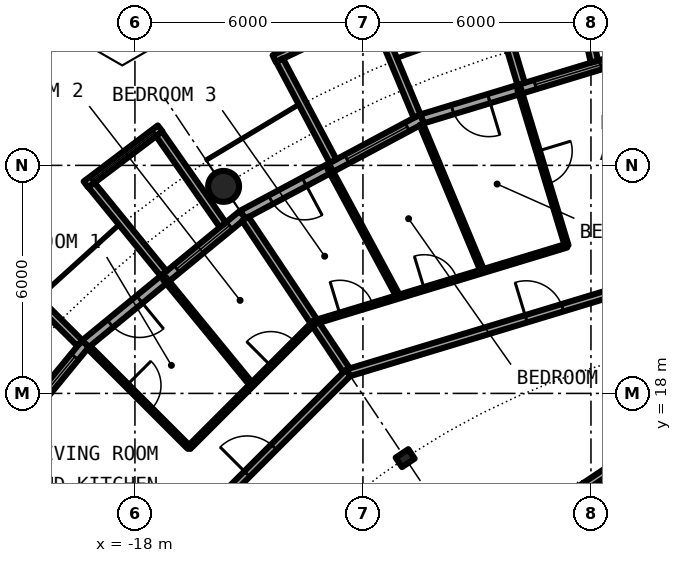
"""IFC4 building model, lengths in metres.
Left out: names, types, materials, properties, quantities, classifications, styles, units other than length and angle.
Written with IfcOpenShell. Run it as: python <this file> out.ifc"""

import sys

from ifc_helpers import new_model, si_unit, direction, frame, frame_2d, origin, origin_2d, place, context, subcontext, project, spatial, rectangle, circle, hollow_circle, i_section, extrude, element, fill, save


model = new_model("IFC4")
c1 = context("Model", 3, precision=1e-05, world=origin(), true_north=direction((0.0, 1.0)))
c2 = subcontext(c1, "Body", "Model", "MODEL_VIEW")
j1 = project(units=[si_unit("LENGTHUNIT", "METRE"), si_unit("PLANEANGLEUNIT", "RADIAN")], contexts=[c1])
p1 = place(None, origin())
s1 = spatial("IfcSite", under=j1, at=p1, CompositionType="ELEMENT")
p2 = place(p1, origin())
s2 = spatial("IfcBuilding", under=s1, at=p2, CompositionType="ELEMENT")
p3 = place(p2, frame((0.0, 0.0, 199.35)))
s3 = spatial("IfcBuildingStorey", under=s2, at=p3, CompositionType="ELEMENT", Elevation=199.35)
p4 = place(p3, frame((-15.667, 23.448, 0.0), z_axis=(0.0, 0.0, 1.0), x_axis=(1.0, 0.0, 0.0)))
e1 = element("IfcColumn", 1, at=p4, inside=s3, PredefinedType="COLUMN", context=c2, shape_type="SweptSolid", body=[
    extrude(hollow_circle(Radius=0.406, WallThickness=0.03, at=origin_2d()), origin(), (0.0, 0.0, 1.0), 3.05),
])
p5 = place(p3, frame((-10.889, 16.297, 0.0), z_axis=(0.0, 0.0, 1.0), x_axis=(-0.55557023302, 0.831469612303, 0.0)))
e2 = element("IfcColumn", 2, at=p5, inside=s3, PredefinedType="COLUMN", context=c2, shape_type="SweptSolid", body=[
    extrude(i_section(OverallWidth=0.3, OverallDepth=0.4, WebThickness=0.013, FlangeThickness=0.024, FilletRadius=0.027, at=origin_2d()), origin(), (0.0, 0.0, 1.0), 3.05),
])
p6 = place(p3, frame((-5.326, 26.775, 0.0), z_axis=(0.0, 0.0, 1.0), x_axis=(-0.956965678721, -0.290201119486, 0.0)))
e3 = element("IfcWall", 3, at=p6, inside=s3, PredefinedType="SOLIDWALL", context=c2, shape_type="SweptSolid", body=[
    extrude(rectangle(XDim=5.351, YDim=0.25, at=frame_2d((2.676, 0.0))), origin(), (0.0, 0.0, 1.0), 2.7),
])
p7 = place(p6, frame((0.441, 0.0, 0.3)))
e4 = element("IfcOpeningElement", 4, at=p7, cuts=e3, PredefinedType="OPENING", context=c2, shape_type="SweptSolid", body=[
    extrude(rectangle(XDim=1.8, YDim=2.1, at=frame_2d((0.9, 1.05))), frame((0.0, 0.135, 0.0), z_axis=(0.0, -1.0, 0.0), x_axis=(1.0, 0.0, 0.0)), (0.0, 0.0, 1.0), 0.27),
])
p8 = place(p6, frame((3.51, 0.0, 0.0)))
e5 = element("IfcOpeningElement", 5, at=p8, cuts=e3, PredefinedType="OPENING", context=c2, shape_type="SweptSolid", body=[
    extrude(rectangle(XDim=1.0, YDim=2.2, at=frame_2d((0.5, 1.1))), frame((0.0, 0.135, 0.0), z_axis=(0.0, -1.0, 0.0), x_axis=(1.0, 0.0, 0.0)), (0.0, 0.0, 1.0), 0.27),
])
p9 = place(p3, frame((-5.909, 26.729, -0.03), z_axis=(0.0, 0.0, 1.0), x_axis=(-0.216409053917, 0.976302781612, 0.0)))
e6 = element("IfcWall", 6, at=p9, inside=s3, PredefinedType="SOLIDWALL", context=c2, shape_type="SweptSolid", body=[
    extrude(rectangle(XDim=2.925, YDim=0.2, at=frame_2d((1.463, 0.0))), origin(), (0.0, 0.0, 1.0), 2.73),
])
p10 = place(p3, frame((-7.837, 26.144, -0.03), z_axis=(0.0, 0.0, 1.0), x_axis=(-0.287064767992, 0.957911174889, 0.0)))
e7 = element("IfcWall", 7, at=p10, inside=s3, PredefinedType="SOLIDWALL", context=c2, shape_type="SweptSolid", body=[
    extrude(rectangle(XDim=3.006, YDim=0.2, at=frame_2d((1.503, 0.0))), origin(), (0.0, 0.0, 1.0), 2.73),
])
p11 = place(p3, frame((-10.447, 25.222, 0.0), z_axis=(0.0, 0.0, 1.0), x_axis=(-0.881915646801, -0.471407246368, 0.0)))
e8 = element("IfcWall", 8, at=p11, inside=s3, PredefinedType="SOLIDWALL", context=c2, shape_type="SweptSolid", body=[
    extrude(rectangle(XDim=5.352, YDim=0.25, at=frame_2d((2.676, 0.0))), origin(), (0.0, 0.0, 1.0), 2.7),
])
p12 = place(p11, frame((0.441, 0.0, 0.3)))
e9 = element("IfcOpeningElement", 9, at=p12, cuts=e8, PredefinedType="OPENING", context=c2, shape_type="SweptSolid", body=[
    extrude(rectangle(XDim=1.8, YDim=2.1, at=frame_2d((0.9, 1.05))), frame((0.0, 0.135, 0.0), z_axis=(0.0, -1.0, 0.0), x_axis=(1.0, 0.0, 0.0)), (0.0, 0.0, 1.0), 0.27),
])
p13 = place(p11, frame((3.51, 0.0, 0.0)))
e10 = element("IfcOpeningElement", 10, at=p13, cuts=e8, PredefinedType="OPENING", context=c2, shape_type="SweptSolid", body=[
    extrude(rectangle(XDim=1.0, YDim=2.2, at=frame_2d((0.5, 1.1))), frame((0.0, 0.135, 0.0), z_axis=(0.0, -1.0, 0.0), x_axis=(1.0, 0.0, 0.0)), (0.0, 0.0, 1.0), 0.27),
])
p14 = place(p3, frame((-11.629, 28.088, -0.03), z_axis=(0.0, 0.0, 1.0), x_axis=(-0.904000060331, -0.427532327342, 0.0)))
e11 = element("IfcWall", 11, at=p14, inside=s3, PredefinedType="SOLIDWALL", context=c2, shape_type="SweptSolid", body=[
    extrude(rectangle(XDim=2.993, YDim=0.2, at=frame_2d((1.497, 0.0))), origin(), (0.0, 0.0, 1.0), 2.73),
])
p15 = place(p14, frame((0.457, 0.0, 0.33)))
e12 = element("IfcOpeningElement", 12, at=p15, cuts=e11, PredefinedType="OPENING", context=c2, shape_type="SweptSolid", body=[
    extrude(circle(Radius=1.04, at=frame_2d((1.04, 1.04))), frame((0.0, 0.11, 0.0), z_axis=(0.0, -1.0, 0.0), x_axis=(1.0, 0.0, 0.0)), (0.0, 0.0, 1.0), 0.22),
])
p16 = place(p3, frame((-10.575, 25.295, -0.03), z_axis=(0.0, 0.0, 1.0), x_axis=(-0.385697364644, 0.922625353492, 0.0)))
e13 = element("IfcWall", 13, at=p16, inside=s3, PredefinedType="SOLIDWALL", context=c2, shape_type="SweptSolid", body=[
    extrude(rectangle(XDim=2.883, YDim=0.2, at=frame_2d((1.442, 0.0))), origin(), (0.0, 0.0, 1.0), 2.73),
])
p17 = place(p3, frame((-12.787, 24.113, -0.03), z_axis=(0.0, 0.0, 1.0), x_axis=(-0.468365282436, 0.883534924159, 0.0)))
e14 = element("IfcWall", 14, at=p17, inside=s3, PredefinedType="SOLIDWALL", context=c2, shape_type="SweptSolid", body=[
    extrude(rectangle(XDim=3.006, YDim=0.2, at=frame_2d((1.503, 0.0))), origin(), (0.0, 0.0, 1.0), 2.73),
])
p18 = place(p3, frame((-15.167, 22.699, 0.0), z_axis=(0.0, 0.0, 1.0), x_axis=(-0.773019449054, -0.634382322723, 0.0)))
e15 = element("IfcWall", 15, at=p18, inside=s3, PredefinedType="SOLIDWALL", context=c2, shape_type="SweptSolid", body=[
    extrude(rectangle(XDim=5.352, YDim=0.25, at=frame_2d((2.676, 0.0))), origin(), (0.0, 0.0, 1.0), 2.7),
])
p19 = place(p18, frame((0.441, 0.0, 0.3)))
e16 = element("IfcOpeningElement", 16, at=p19, cuts=e15, PredefinedType="OPENING", context=c2, shape_type="SweptSolid", body=[
    extrude(rectangle(XDim=1.8, YDim=2.1, at=frame_2d((0.9, 1.05))), frame((0.0, 0.135, 0.0), z_axis=(0.0, -1.0, 0.0), x_axis=(1.0, 0.0, 0.0)), (0.0, 0.0, 1.0), 0.27),
])
p20 = place(p18, frame((3.51, 0.0, 0.0)))
e17 = element("IfcOpeningElement", 17, at=p20, cuts=e15, PredefinedType="OPENING", context=c2, shape_type="SweptSolid", body=[
    extrude(rectangle(XDim=1.0, YDim=2.2, at=frame_2d((0.5, 1.1))), frame((0.0, 0.135, 0.0), z_axis=(0.0, -1.0, 0.0), x_axis=(1.0, 0.0, 0.0)), (0.0, 0.0, 1.0), 0.27),
])
p21 = place(p3, frame((-17.337, 24.972, -0.03), z_axis=(0.0, 0.0, 1.0), x_axis=(-0.797887588059, -0.602806268067, 0.0)))
e18 = element("IfcWall", 18, at=p21, inside=s3, PredefinedType="SOLIDWALL", context=c2, shape_type="SweptSolid", body=[
    extrude(rectangle(XDim=2.447, YDim=0.2, at=frame_2d((1.223, 0.0))), origin(), (0.0, 0.0, 1.0), 2.73),
])
p22 = place(p21, frame((0.183, 0.0, 0.33)))
e19 = element("IfcOpeningElement", 19, at=p22, cuts=e18, PredefinedType="OPENING", context=c2, shape_type="SweptSolid", body=[
    extrude(circle(Radius=1.04, at=frame_2d((1.04, 1.04))), frame((0.0, 0.11, 0.0), z_axis=(0.0, -1.0, 0.0), x_axis=(1.0, 0.0, 0.0)), (0.0, 0.0, 1.0), 0.22),
])
p23 = place(p3, frame((-15.688, 22.433, -0.03), z_axis=(0.0, 0.0, 1.0), x_axis=(-0.573260687834, 0.819373043115, 0.0)))
e20 = element("IfcWall", 20, at=p23, inside=s3, PredefinedType="SOLIDWALL", context=c2, shape_type="SweptSolid", body=[
    extrude(rectangle(XDim=2.925, YDim=0.2, at=frame_2d((1.463, 0.0))), origin(), (0.0, 0.0, 1.0), 2.73),
])
p24 = place(p3, frame((-17.246, 21.155, -0.03), z_axis=(0.0, 0.0, 1.0), x_axis=(-0.631741648902, 0.775179004516, 0.0)))
e21 = element("IfcWall", 21, at=p24, inside=s3, PredefinedType="SOLIDWALL", context=c2, shape_type="SweptSolid", body=[
    extrude(rectangle(XDim=3.006, YDim=0.2, at=frame_2d((1.503, 0.0))), origin(), (0.0, 0.0, 1.0), 2.73),
])
p25 = place(p3, frame((-19.304, 19.304, 0.0), z_axis=(0.0, 0.0, 1.0), x_axis=(-0.634382322723, -0.773019449054, 0.0)))
e22 = element("IfcWall", 22, at=p25, inside=s3, PredefinedType="SOLIDWALL", context=c2, shape_type="SweptSolid", body=[
    extrude(rectangle(XDim=5.352, YDim=0.25, at=frame_2d((2.676, 0.0))), origin(), (0.0, 0.0, 1.0), 2.7),
])
p26 = place(p25, frame((0.441, 0.0, 0.3)))
e23 = element("IfcOpeningElement", 23, at=p26, cuts=e22, PredefinedType="OPENING", context=c2, shape_type="SweptSolid", body=[
    extrude(rectangle(XDim=1.8, YDim=2.1, at=frame_2d((0.9, 1.05))), frame((0.0, 0.135, 0.0), z_axis=(0.0, -1.0, 0.0), x_axis=(1.0, 0.0, 0.0)), (0.0, 0.0, 1.0), 0.27),
])
p27 = place(p25, frame((3.51, 0.0, 0.0)))
e24 = element("IfcOpeningElement", 24, at=p27, cuts=e22, PredefinedType="OPENING", context=c2, shape_type="SweptSolid", body=[
    extrude(rectangle(XDim=1.0, YDim=2.2, at=frame_2d((0.5, 1.1))), frame((0.0, 0.135, 0.0), z_axis=(0.0, -1.0, 0.0), x_axis=(1.0, 0.0, 0.0)), (0.0, 0.0, 1.0), 0.27),
])
p28 = place(p3, frame((-19.45, 19.323, -0.03), z_axis=(0.0, 0.0, 1.0), x_axis=(-0.709727076896, 0.704476739375, 0.0)))
e25 = element("IfcWall", 25, at=p28, inside=s3, PredefinedType="SOLIDWALL", context=c2, shape_type="SweptSolid", body=[
    extrude(rectangle(XDim=2.883, YDim=0.2, at=frame_2d((1.441, 0.0))), origin(), (0.0, 0.0, 1.0), 2.73),
])
p29 = place(p3, frame((-19.216, 19.216, 0.0), z_axis=(0.0, 0.0, 1.0), x_axis=(0.707106781187, -0.707106781187, 0.0)))
e26 = element("IfcWall", 26, at=p29, inside=s3, PredefinedType="PARTITIONING", context=c2, shape_type="SweptSolid", body=[
    extrude(rectangle(XDim=3.735, YDim=0.1, at=frame_2d((1.868, 0.0))), origin(), (0.0, 0.0, 1.0), 2.7),
])
p30 = place(p29, frame((1.417, 0.0, 0.0)))
e27 = element("IfcOpeningElement", 27, at=p30, cuts=e26, PredefinedType="OPENING", context=c2, shape_type="SweptSolid", body=[
    extrude(rectangle(XDim=0.9, YDim=2.3, at=frame_2d((0.45, 1.15))), frame((0.0, 0.06, 0.0), z_axis=(0.0, -1.0, 0.0), x_axis=(1.0, 0.0, 0.0)), (0.0, 0.0, 1.0), 0.12),
])
p31 = place(p3, frame((-17.22, 21.023, 0.0), z_axis=(0.0, 0.0, 1.0), x_axis=(0.633737383709, -0.773548271597, 0.0)))
e28 = element("IfcWall", 28, at=p31, inside=s3, PredefinedType="PARTITIONING", context=c2, shape_type="SweptSolid", body=[
    extrude(rectangle(XDim=3.618, YDim=0.1, at=frame_2d((1.809, 0.0))), origin(), (0.0, 0.0, 1.0), 2.7),
])
p32 = place(p3, frame((-15.097, 22.596, 0.0), z_axis=(0.0, 0.0, 1.0), x_axis=(0.555462686211, -0.831541462723, 0.0)))
e29 = element("IfcWall", 29, at=p32, inside=s3, PredefinedType="PARTITIONING", context=c2, shape_type="SweptSolid", body=[
    extrude(rectangle(XDim=4.875, YDim=0.2, at=frame_2d((2.438, 0.0))), origin(), (0.0, 0.0, 1.0), 2.7),
])
p33 = place(p3, frame((-12.887, 23.925, 0.0), z_axis=(0.0, 0.0, 1.0), x_axis=(0.474281720599, -0.88037313084, 0.0)))
e30 = element("IfcWall", 30, at=p33, inside=s3, PredefinedType="PARTITIONING", context=c2, shape_type="SweptSolid", body=[
    extrude(rectangle(XDim=3.842, YDim=0.1, at=frame_2d((1.921, 0.0))), origin(), (0.0, 0.0, 1.0), 2.7),
])
p34 = place(p3, frame((-10.465, 25.079, 0.0), z_axis=(0.0, 0.0, 1.0), x_axis=(0.385232176411, -0.922819684585, 0.0)))
e31 = element("IfcWall", 31, at=p34, inside=s3, PredefinedType="PARTITIONING", context=c2, shape_type="SweptSolid", body=[
    extrude(rectangle(XDim=4.187, YDim=0.1, at=frame_2d((2.094, 0.0))), origin(), (0.0, 0.0, 1.0), 2.7),
])
p35 = place(p3, frame((-7.888, 26.005, 0.0), z_axis=(0.0, 0.0, 1.0), x_axis=(0.290193157742, -0.956968093094, 0.0)))
e32 = element("IfcWall", 32, at=p35, inside=s3, PredefinedType="PARTITIONING", context=c2, shape_type="SweptSolid", body=[
    extrude(rectangle(XDim=4.304, YDim=0.1, at=frame_2d((2.152, 0.0))), origin(), (0.0, 0.0, 1.0), 2.7),
])
p36 = place(p35, frame((1.702, 0.0, 0.0)))
e33 = element("IfcOpeningElement", 33, at=p36, cuts=e32, PredefinedType="OPENING", context=c2, shape_type="SweptSolid", body=[
    extrude(rectangle(XDim=0.9, YDim=2.3, at=frame_2d((0.45, 1.15))), frame((0.0, 0.06, 0.0), z_axis=(0.0, -1.0, 0.0), x_axis=(1.0, 0.0, 0.0)), (0.0, 0.0, 1.0), 0.12),
])
p37 = place(p3, frame((-14.718, 9.832, 0.0), z_axis=(0.0, 0.0, 1.0), x_axis=(0.831437137577, 0.555618831806, 0.0)))
e34 = element("IfcWall", 34, at=p37, inside=s3, PredefinedType="PARTITIONING", context=c2, shape_type="SweptSolid", body=[
    extrude(rectangle(XDim=13.549, YDim=0.2, at=frame_2d((6.774, 0.0))), origin(), (0.0, 0.0, 1.0), 2.7),
])
p38 = place(p37, frame((7.968, 0.0, 0.0)))
e35 = element("IfcOpeningElement", 35, at=p38, cuts=e34, PredefinedType="OPENING", context=c2, shape_type="SweptSolid", body=[
    extrude(rectangle(XDim=1.0, YDim=2.3, at=frame_2d((0.5, 1.15))), frame((0.0, 0.11, 0.0), z_axis=(0.0, -1.0, 0.0), x_axis=(1.0, 0.0, 0.0)), (0.0, 0.0, 1.0), 0.22),
])
p39 = place(p3, frame((-12.389, 18.542, 0.0), z_axis=(0.0, 0.0, 1.0), x_axis=(0.956942051091, 0.290279022415, 0.0)))
e36 = element("IfcWall", 36, at=p39, inside=s3, PredefinedType="PARTITIONING", context=c2, shape_type="SweptSolid", body=[
    extrude(rectangle(XDim=12.946, YDim=0.2, at=frame_2d((6.473, 0.0))), origin(), (0.0, 0.0, 1.0), 2.7),
])
p40 = place(p39, frame((4.895, 0.0, 0.0)))
e37 = element("IfcOpeningElement", 37, at=p40, cuts=e36, PredefinedType="OPENING", context=c2, shape_type="SweptSolid", body=[
    extrude(rectangle(XDim=1.0, YDim=2.3, at=frame_2d((0.5, 1.15))), frame((0.0, 0.11, 0.0), z_axis=(0.0, -1.0, 0.0), x_axis=(1.0, 0.0, 0.0)), (0.0, 0.0, 1.0), 0.22),
])
p41 = place(p3, frame((-18.542, 12.389, 0.0), z_axis=(0.0, 0.0, 1.0), x_axis=(0.707106781187, 0.707106781187, 0.0)))
e38 = element("IfcWall", 38, at=p41, inside=s3, PredefinedType="PARTITIONING", context=c2, shape_type="SweptSolid", body=[
    extrude(rectangle(XDim=8.702, YDim=0.2, at=frame_2d((4.351, 0.0))), origin(), (0.0, 0.0, 1.0), 2.7),
])
p42 = place(p41, frame((4.938, 0.0, 0.0)))
e39 = element("IfcOpeningElement", 39, at=p42, cuts=e38, PredefinedType="OPENING", context=c2, shape_type="SweptSolid", body=[
    extrude(rectangle(XDim=1.0, YDim=2.3, at=frame_2d((0.5, 1.15))), frame((0.0, 0.11, 0.0), z_axis=(0.0, -1.0, 0.0), x_axis=(1.0, 0.0, 0.0)), (0.0, 0.0, 1.0), 0.22),
])
p43 = place(p3, frame((-13.281, 19.871, 0.0), z_axis=(0.0, 0.0, 1.0), x_axis=(0.956938868877, 0.290289512785, 0.0)))
e40 = element("IfcWall", 40, at=p43, inside=s3, PredefinedType="PARTITIONING", context=c2, shape_type="SweptSolid", body=[
    extrude(rectangle(XDim=6.941, YDim=0.1, at=frame_2d((3.47, 0.0))), origin(), (0.0, 0.0, 1.0), 2.7),
])
p44 = place(p43, frame((3.025, 0.0, 0.0)))
e41 = element("IfcOpeningElement", 41, at=p44, cuts=e40, PredefinedType="OPENING", context=c2, shape_type="SweptSolid", body=[
    extrude(rectangle(XDim=0.9, YDim=2.3, at=frame_2d((0.45, 1.15))), frame((0.0, 0.06, 0.0), z_axis=(0.0, -1.0, 0.0), x_axis=(1.0, 0.0, 0.0)), (0.0, 0.0, 1.0), 0.12),
])
p45 = place(p43, frame((0.708, 0.0, 0.0)))
e42 = element("IfcOpeningElement", 42, at=p45, cuts=e40, PredefinedType="OPENING", context=c2, shape_type="SweptSolid", body=[
    extrude(rectangle(XDim=0.9, YDim=2.3, at=frame_2d((0.45, 1.15))), frame((0.0, 0.06, 0.0), z_axis=(0.0, -1.0, 0.0), x_axis=(1.0, 0.0, 0.0)), (0.0, 0.0, 1.0), 0.12),
])
p46 = place(p3, frame((-16.575, 16.575, 0.0), z_axis=(0.0, 0.0, 1.0), x_axis=(0.707080600289, 0.707132961115, 0.0)))
e43 = element("IfcWall", 43, at=p46, inside=s3, PredefinedType="PARTITIONING", context=c2, shape_type="SweptSolid", body=[
    extrude(rectangle(XDim=4.663, YDim=0.1, at=frame_2d((2.331, 0.0))), origin(), (0.0, 0.0, 1.0), 2.7),
])
p47 = place(p46, frame((3.043, 0.0, 0.0)))
e44 = element("IfcOpeningElement", 44, at=p47, cuts=e43, PredefinedType="OPENING", context=c2, shape_type="SweptSolid", body=[
    extrude(rectangle(XDim=0.9, YDim=2.3, at=frame_2d((0.45, 1.15))), frame((0.0, 0.06, 0.0), z_axis=(0.0, -1.0, 0.0), x_axis=(1.0, 0.0, 0.0)), (0.0, 0.0, 1.0), 0.12),
])
p48 = place(p7, origin())
e45 = element("IfcWindow", 45, at=p48, inside=s3, PartitioningType="SINGLE_PANEL", PredefinedType="WINDOW", context=c2, shape_type="SweptSolid", body=[
    extrude(rectangle(XDim=1.8, YDim=2.1, at=frame_2d((0.9, 1.05))), frame((0.0, 0.03, 0.0), z_axis=(0.0, -1.0, 0.0), x_axis=(1.0, 0.0, 0.0)), (0.0, 0.0, 1.0), 0.06),
])
fill(e4, e45)
p49 = place(p8, origin())
e46 = element("IfcDoor", 46, at=p49, inside=s3, OperationType="SINGLE_SWING_LEFT", PredefinedType="DOOR", context=c2, shape_type="SweptSolid", body=[
    extrude(rectangle(XDim=1.0, YDim=2.2, at=frame_2d((0.5, 1.1))), frame((0.0, 0.025, 0.0), z_axis=(0.0, -1.0, 0.0), x_axis=(1.0, 0.0, 0.0)), (0.0, 0.0, 1.0), 0.05),
])
fill(e5, e46)
p50 = place(p12, origin())
e47 = element("IfcWindow", 47, at=p50, inside=s3, PartitioningType="SINGLE_PANEL", PredefinedType="WINDOW", context=c2, shape_type="SweptSolid", body=[
    extrude(rectangle(XDim=1.8, YDim=2.1, at=frame_2d((0.9, 1.05))), frame((0.0, 0.03, 0.0), z_axis=(0.0, -1.0, 0.0), x_axis=(1.0, 0.0, 0.0)), (0.0, 0.0, 1.0), 0.06),
])
fill(e9, e47)
p51 = place(p15, origin())
e48 = element("IfcWindow", 48, at=p51, inside=s3, PartitioningType="SINGLE_PANEL", PredefinedType="WINDOW", context=c2, shape_type="SweptSolid", body=[
    extrude(circle(Radius=1.04, at=frame_2d((1.04, 1.04))), frame((0.0, 0.03, 0.0), z_axis=(0.0, -1.0, 0.0), x_axis=(1.0, 0.0, 0.0)), (0.0, 0.0, 1.0), 0.06),
])
fill(e12, e48)
p52 = place(p13, origin())
e49 = element("IfcDoor", 49, at=p52, inside=s3, OperationType="SINGLE_SWING_LEFT", PredefinedType="DOOR", context=c2, shape_type="SweptSolid", body=[
    extrude(rectangle(XDim=1.0, YDim=2.2, at=frame_2d((0.5, 1.1))), frame((0.0, 0.025, 0.0), z_axis=(0.0, -1.0, 0.0), x_axis=(1.0, 0.0, 0.0)), (0.0, 0.0, 1.0), 0.05),
])
fill(e10, e49)
p53 = place(p19, origin())
e50 = element("IfcWindow", 50, at=p53, inside=s3, PartitioningType="SINGLE_PANEL", PredefinedType="WINDOW", context=c2, shape_type="SweptSolid", body=[
    extrude(rectangle(XDim=1.8, YDim=2.1, at=frame_2d((0.9, 1.05))), frame((0.0, 0.03, 0.0), z_axis=(0.0, -1.0, 0.0), x_axis=(1.0, 0.0, 0.0)), (0.0, 0.0, 1.0), 0.06),
])
fill(e16, e50)
p54 = place(p22, origin())
e51 = element("IfcWindow", 51, at=p54, inside=s3, PartitioningType="SINGLE_PANEL", PredefinedType="WINDOW", context=c2, shape_type="SweptSolid", body=[
    extrude(circle(Radius=1.04, at=frame_2d((1.04, 1.04))), frame((0.0, 0.03, 0.0), z_axis=(0.0, -1.0, 0.0), x_axis=(1.0, 0.0, 0.0)), (0.0, 0.0, 1.0), 0.06),
])
fill(e19, e51)
p55 = place(p20, origin())
e52 = element("IfcDoor", 52, at=p55, inside=s3, OperationType="SINGLE_SWING_LEFT", PredefinedType="DOOR", context=c2, shape_type="SweptSolid", body=[
    extrude(rectangle(XDim=1.0, YDim=2.2, at=frame_2d((0.5, 1.1))), frame((0.0, 0.025, 0.0), z_axis=(0.0, -1.0, 0.0), x_axis=(1.0, 0.0, 0.0)), (0.0, 0.0, 1.0), 0.05),
])
fill(e17, e52)
p56 = place(p26, origin())
e53 = element("IfcWindow", 53, at=p56, inside=s3, PartitioningType="SINGLE_PANEL", PredefinedType="WINDOW", context=c2, shape_type="SweptSolid", body=[
    extrude(rectangle(XDim=1.8, YDim=2.1, at=frame_2d((0.9, 1.05))), frame((0.0, 0.03, 0.0), z_axis=(0.0, -1.0, 0.0), x_axis=(1.0, 0.0, 0.0)), (0.0, 0.0, 1.0), 0.06),
])
fill(e23, e53)
p57 = place(p40, origin())
e54 = element("IfcDoor", 54, at=p57, inside=s3, OperationType="SINGLE_SWING_LEFT", PredefinedType="DOOR", context=c2, shape_type="SweptSolid", body=[
    extrude(rectangle(XDim=1.0, YDim=2.3, at=frame_2d((0.5, 1.15))), frame((0.0, 0.025, 0.0), z_axis=(0.0, -1.0, 0.0), x_axis=(1.0, 0.0, 0.0)), (0.0, 0.0, 1.0), 0.05),
])
fill(e37, e54)
p58 = place(p36, origin())
e55 = element("IfcDoor", 55, at=p58, inside=s3, OperationType="SINGLE_SWING_LEFT", PredefinedType="DOOR", context=c2, shape_type="SweptSolid", body=[
    extrude(rectangle(XDim=0.9, YDim=2.3, at=frame_2d((0.45, 1.15))), frame((0.0, 0.025, 0.0), z_axis=(0.0, -1.0, 0.0), x_axis=(1.0, 0.0, 0.0)), (0.0, 0.0, 1.0), 0.05),
])
fill(e33, e55)
p59 = place(p44, origin())
e56 = element("IfcDoor", 56, at=p59, inside=s3, OperationType="SINGLE_SWING_RIGHT", PredefinedType="DOOR", context=c2, shape_type="SweptSolid", body=[
    extrude(rectangle(XDim=0.9, YDim=2.3, at=frame_2d((0.45, 1.15))), frame((0.0, 0.025, 0.0), z_axis=(0.0, -1.0, 0.0), x_axis=(1.0, 0.0, 0.0)), (0.0, 0.0, 1.0), 0.05),
])
fill(e41, e56)
p60 = place(p45, origin())
e57 = element("IfcDoor", 57, at=p60, inside=s3, OperationType="SINGLE_SWING_LEFT", PredefinedType="DOOR", context=c2, shape_type="SweptSolid", body=[
    extrude(rectangle(XDim=0.9, YDim=2.3, at=frame_2d((0.45, 1.15))), frame((0.0, 0.025, 0.0), z_axis=(0.0, -1.0, 0.0), x_axis=(1.0, 0.0, 0.0)), (0.0, 0.0, 1.0), 0.05),
])
fill(e42, e57)
p61 = place(p42, origin())
e58 = element("IfcDoor", 58, at=p61, inside=s3, OperationType="SINGLE_SWING_RIGHT", PredefinedType="DOOR", context=c2, shape_type="SweptSolid", body=[
    extrude(rectangle(XDim=1.0, YDim=2.3, at=frame_2d((0.5, 1.15))), frame((0.0, 0.025, 0.0), z_axis=(0.0, -1.0, 0.0), x_axis=(1.0, 0.0, 0.0)), (0.0, 0.0, 1.0), 0.05),
])
fill(e39, e58)
p62 = place(p30, origin())
e59 = element("IfcDoor", 59, at=p62, inside=s3, OperationType="SINGLE_SWING_LEFT", PredefinedType="DOOR", context=c2, shape_type="SweptSolid", body=[
    extrude(rectangle(XDim=0.9, YDim=2.3, at=frame_2d((0.45, 1.15))), frame((0.0, 0.025, 0.0), z_axis=(0.0, -1.0, 0.0), x_axis=(1.0, 0.0, 0.0)), (0.0, 0.0, 1.0), 0.05),
])
fill(e27, e59)
p63 = place(p47, origin())
e60 = element("IfcDoor", 60, at=p63, inside=s3, OperationType="SINGLE_SWING_RIGHT", PredefinedType="DOOR", context=c2, shape_type="SweptSolid", body=[
    extrude(rectangle(XDim=0.9, YDim=2.3, at=frame_2d((0.45, 1.15))), frame((0.0, 0.025, 0.0), z_axis=(0.0, -1.0, 0.0), x_axis=(1.0, 0.0, 0.0)), (0.0, 0.0, 1.0), 0.05),
])
fill(e44, e60)
save(model, sys.argv[1])
